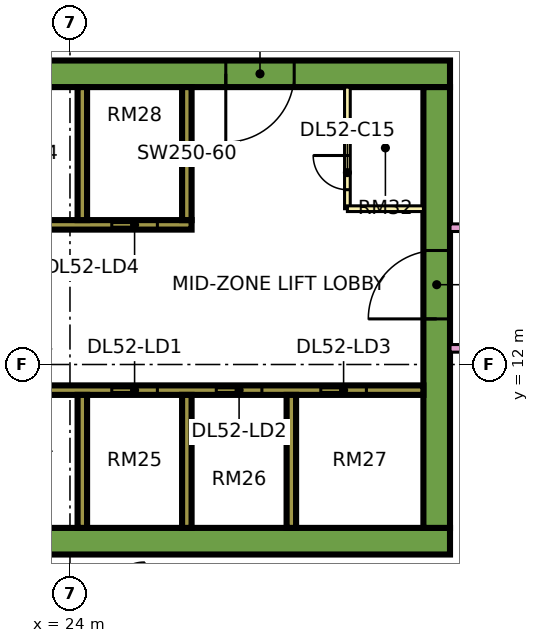
"""IFC4 building model, lengths in metres.
Left out: names, types, materials, properties, quantities, classifications, styles, units other than length and angle.
Written with IfcOpenShell. Run it as: python <this file> out.ifc"""

import sys

from ifc_helpers import new_model, si_unit, direction, frame, frame_2d, origin, place, context, subcontext, project, spatial, rectangle, extrude, element, fill, save


model = new_model("IFC4")
c1 = context("Model", 3, precision=1e-05, world=origin(), true_north=direction((0.0, 1.0)))
c2 = subcontext(c1, "Body", "Model", "MODEL_VIEW")
j1 = project(units=[si_unit("LENGTHUNIT", "METRE"), si_unit("PLANEANGLEUNIT", "RADIAN")], contexts=[c1])
p1 = place(None, origin())
s1 = spatial("IfcSite", under=j1, at=p1, CompositionType="ELEMENT")
p2 = place(p1, origin())
s2 = spatial("IfcBuilding", under=s1, at=p2, CompositionType="ELEMENT")
p3 = place(p2, frame((0.0, 0.0, 222.9)))
s3 = spatial("IfcBuildingStorey", under=s2, at=p3, CompositionType="ELEMENT", Elevation=222.9)
p4 = place(p3, frame((9.0, 7.35, 0.0), z_axis=(0.0, 0.0, 1.0), x_axis=(1.0, 0.0, 0.0)))
e1 = element("IfcWall", 1, at=p4, inside=s3, PredefinedType="SHEAR", context=c2, shape_type="SweptSolid", body=[
    extrude(rectangle(XDim=25.0, YDim=0.7, at=frame_2d((12.5, 0.0))), origin(), (0.0, 0.0, 1.0), 3.75),
])
p5 = place(p3, frame((9.0, 19.65, 0.0), z_axis=(0.0, 0.0, 1.0), x_axis=(1.0, 0.0, 0.0)))
e2 = element("IfcWall", 2, at=p5, inside=s3, PredefinedType="SHEAR", context=c2, shape_type="SweptSolid", body=[
    extrude(rectangle(XDim=25.0, YDim=0.7, at=frame_2d((12.5, 0.0))), origin(), (0.0, 0.0, 1.0), 3.75),
])
p6 = place(p5, frame((19.1, 0.0, 0.0)))
e3 = element("IfcOpeningElement", 3, at=p6, cuts=e2, PredefinedType="OPENING", context=c2, shape_type="SweptSolid", body=[
    extrude(rectangle(XDim=1.8, YDim=2.4, at=frame_2d((0.9, 1.2))), frame((0.0, 0.36, 0.0), z_axis=(0.0, -1.0, 0.0), x_axis=(1.0, 0.0, 0.0)), (0.0, 0.0, 1.0), 0.72),
])
p7 = place(p3, frame((33.65, 7.7, 0.0), z_axis=(0.0, 0.0, 1.0), x_axis=(0.0, 1.0, 0.0)))
e4 = element("IfcWall", 4, at=p7, inside=s3, PredefinedType="SHEAR", context=c2, shape_type="SweptSolid", body=[
    extrude(rectangle(XDim=11.6, YDim=0.7, at=frame_2d((5.8, 0.0))), origin(), (0.0, 0.0, 1.0), 3.75),
])
p8 = place(p7, frame((5.5, 0.0, 0.0)))
e5 = element("IfcOpeningElement", 5, at=p8, cuts=e4, PredefinedType="OPENING", context=c2, shape_type="SweptSolid", body=[
    extrude(rectangle(XDim=1.8, YDim=2.4, at=frame_2d((0.9, 1.2))), frame((0.0, 0.36, 0.0), z_axis=(0.0, -1.0, 0.0), x_axis=(1.0, 0.0, 0.0)), (0.0, 0.0, 1.0), 0.72),
])
p9 = place(p3, frame((13.45, 11.325, 0.0), z_axis=(0.0, 0.0, 1.0), x_axis=(1.0, 0.0, 0.0)))
e6 = element("IfcWall", 6, at=p9, inside=s3, PredefinedType="SHEAR", context=c2, shape_type="SweptSolid", body=[
    extrude(rectangle(XDim=19.85, YDim=0.25, at=frame_2d((9.925, 0.0))), origin(), (0.0, 0.0, 1.0), 3.75),
])
p10 = place(p9, frame((11.65, 0.0, 0.0)))
e7 = element("IfcOpeningElement", 7, at=p10, cuts=e6, PredefinedType="OPENING", context=c2, shape_type="SweptSolid", body=[
    extrude(rectangle(XDim=1.2, YDim=2.2, at=frame_2d((0.6, 1.1))), frame((0.0, 0.135, 0.0), z_axis=(0.0, -1.0, 0.0), x_axis=(1.0, 0.0, 0.0)), (0.0, 0.0, 1.0), 0.27),
])
p11 = place(p9, frame((14.4, 0.0, 0.0)))
e8 = element("IfcOpeningElement", 8, at=p11, cuts=e6, PredefinedType="OPENING", context=c2, shape_type="SweptSolid", body=[
    extrude(rectangle(XDim=1.2, YDim=2.2, at=frame_2d((0.6, 1.1))), frame((0.0, 0.135, 0.0), z_axis=(0.0, -1.0, 0.0), x_axis=(1.0, 0.0, 0.0)), (0.0, 0.0, 1.0), 0.27),
])
p12 = place(p9, frame((17.15, 0.0, 0.0)))
e9 = element("IfcOpeningElement", 9, at=p12, cuts=e6, PredefinedType="OPENING", context=c2, shape_type="SweptSolid", body=[
    extrude(rectangle(XDim=1.2, YDim=2.2, at=frame_2d((0.6, 1.1))), frame((0.0, 0.135, 0.0), z_axis=(0.0, -1.0, 0.0), x_axis=(1.0, 0.0, 0.0)), (0.0, 0.0, 1.0), 0.27),
])
p13 = place(p9, frame((1.55, 0.0, 0.0)))
e10 = element("IfcOpeningElement", 10, at=p13, cuts=e6, PredefinedType="OPENING", context=c2, shape_type="SweptSolid", body=[
    extrude(rectangle(XDim=0.9, YDim=2.1, at=frame_2d((0.45, 1.05))), frame((0.0, 0.135, 0.0), z_axis=(0.0, -1.0, 0.0), x_axis=(1.0, 0.0, 0.0)), (0.0, 0.0, 1.0), 0.27),
])
p14 = place(p9, frame((5.05, 0.0, 0.0)))
e11 = element("IfcOpeningElement", 11, at=p14, cuts=e6, PredefinedType="OPENING", context=c2, shape_type="SweptSolid", body=[
    extrude(rectangle(XDim=0.9, YDim=2.1, at=frame_2d((0.45, 1.05))), frame((0.0, 0.135, 0.0), z_axis=(0.0, -1.0, 0.0), x_axis=(1.0, 0.0, 0.0)), (0.0, 0.0, 1.0), 0.27),
])
p15 = place(p9, frame((8.425, 0.0, 0.0)))
e12 = element("IfcOpeningElement", 12, at=p15, cuts=e6, PredefinedType="OPENING", context=c2, shape_type="SweptSolid", body=[
    extrude(rectangle(XDim=0.9, YDim=2.1, at=frame_2d((0.45, 1.05))), frame((0.0, 0.135, 0.0), z_axis=(0.0, -1.0, 0.0), x_axis=(1.0, 0.0, 0.0)), (0.0, 0.0, 1.0), 0.27),
])
p16 = place(p3, frame((13.45, 15.675, 0.0), z_axis=(0.0, 0.0, 1.0), x_axis=(1.0, 0.0, 0.0)))
e13 = element("IfcWall", 13, at=p16, inside=s3, PredefinedType="SHEAR", context=c2, shape_type="SweptSolid", body=[
    extrude(rectangle(XDim=13.75, YDim=0.25, at=frame_2d((6.875, 0.0))), origin(), (0.0, 0.0, 1.0), 3.75),
])
p17 = place(p16, frame((11.65, 0.0, 0.0)))
e14 = element("IfcOpeningElement", 14, at=p17, cuts=e13, PredefinedType="OPENING", context=c2, shape_type="SweptSolid", body=[
    extrude(rectangle(XDim=1.2, YDim=2.2, at=frame_2d((0.6, 1.1))), frame((0.0, 0.135, 0.0), z_axis=(0.0, -1.0, 0.0), x_axis=(1.0, 0.0, 0.0)), (0.0, 0.0, 1.0), 0.27),
])
for number, where, z_axis, x_axis in (
    (15, (24.325, 7.7, 0.0), (0.0, 0.0, 1.0), (0.0, 1.0, 0.0)),
    (16, (27.075, 7.7, 0.0), (0.0, 0.0, 1.0), (0.0, 1.0, 0.0)),
    (17, (29.825, 7.7, 0.0), (0.0, 0.0, 1.0), (0.0, 1.0, 0.0)),
    (18, (24.325, 15.8, 0.0), (0.0, 0.0, 1.0), (0.0, 1.0, 0.0)),
    (19, (27.075, 15.8, 0.0), (0.0, 0.0, 1.0), (0.0, 1.0, 0.0)),
):
    element("IfcWall", number, at=place(p3, frame(where, z_axis=z_axis, x_axis=x_axis)), inside=s3, PredefinedType="SHEAR", context=c2, shape_type="SweptSolid", body=[
        extrude(rectangle(XDim=3.5, YDim=0.25, at=frame_2d((1.75, 0.0))), origin(), (0.0, 0.0, 1.0), 3.75),
    ])
p18 = place(p3, frame((31.3, 16.1, 0.0), z_axis=(0.0, 0.0, 1.0), x_axis=(0.0, 1.0, 0.0)))
e20 = element("IfcWall", 20, at=p18, inside=s3, PredefinedType="PARTITIONING", context=c2, shape_type="SweptSolid", body=[
    extrude(rectangle(XDim=3.2, YDim=0.15, at=frame_2d((1.6, 0.0))), origin(), (0.0, 0.0, 1.0), 3.35),
])
p19 = place(p18, frame((0.5, 0.0, 0.0)))
e21 = element("IfcOpeningElement", 21, at=p19, cuts=e20, PredefinedType="OPENING", context=c2, shape_type="SweptSolid", body=[
    extrude(rectangle(XDim=0.9, YDim=2.1, at=frame_2d((0.45, 1.05))), frame((0.0, 0.085, 0.0), z_axis=(0.0, -1.0, 0.0), x_axis=(1.0, 0.0, 0.0)), (0.0, 0.0, 1.0), 0.17),
])
p20 = place(p3, frame((31.3, 16.1, 0.0), z_axis=(0.0, 0.0, 1.0), x_axis=(1.0, 0.0, 0.0)))
e22 = element("IfcWall", 22, at=p20, inside=s3, PredefinedType="PARTITIONING", context=c2, shape_type="SweptSolid", body=[
    extrude(rectangle(XDim=2.0, YDim=0.15, at=frame_2d((1.0, 0.0))), origin(), (0.0, 0.0, 1.0), 3.35),
])
p21 = place(p3, frame((34.0, 12.425, 0.0), z_axis=(0.0, 0.0, 1.0), x_axis=(1.0, 0.0, 0.0)))
e23 = element("IfcWall", 23, at=p21, inside=s3, PredefinedType="PARTITIONING", context=c2, shape_type="SweptSolid", body=[
    extrude(rectangle(XDim=2.426, YDim=0.2, at=frame_2d((1.213, 0.0))), origin(), (0.0, 0.0, 1.0), 3.35),
])
p22 = place(p3, frame((34.0, 15.6, 0.0), z_axis=(0.0, 0.0, 1.0), x_axis=(1.0, 0.0, 0.0)))
e24 = element("IfcWall", 24, at=p22, inside=s3, PredefinedType="PARTITIONING", context=c2, shape_type="SweptSolid", body=[
    extrude(rectangle(XDim=10.35, YDim=0.2, at=frame_2d((5.175, 0.0))), origin(), (0.0, 0.0, 1.0), 3.35),
])
p23 = place(p22, frame((5.6, 0.0, 0.0)))
e25 = element("IfcOpeningElement", 25, at=p23, cuts=e24, PredefinedType="OPENING", context=c2, shape_type="SweptSolid", body=[
    extrude(rectangle(XDim=1.0, YDim=2.1, at=frame_2d((0.5, 1.05))), frame((0.0, 0.11, 0.0), z_axis=(0.0, -1.0, 0.0), x_axis=(1.0, 0.0, 0.0)), (0.0, 0.0, 1.0), 0.22),
])
p24 = place(p22, frame((0.45, 0.0, 0.0)))
e26 = element("IfcOpeningElement", 26, at=p24, cuts=e24, PredefinedType="OPENING", context=c2, shape_type="SweptSolid", body=[
    extrude(rectangle(XDim=1.2, YDim=2.1, at=frame_2d((0.6, 1.05))), frame((0.0, 0.11, 0.0), z_axis=(0.0, -1.0, 0.0), x_axis=(1.0, 0.0, 0.0)), (0.0, 0.0, 1.0), 0.22),
])
p25 = place(p10, origin())
e27 = element("IfcDoor", 27, at=p25, inside=s3, OperationType="DOUBLE_DOOR_SLIDING", PredefinedType="DOOR", context=c2, shape_type="SweptSolid", body=[
    extrude(rectangle(XDim=1.2, YDim=2.2, at=frame_2d((0.6, 1.1))), frame((0.0, 0.025, 0.0), z_axis=(0.0, -1.0, 0.0), x_axis=(1.0, 0.0, 0.0)), (0.0, 0.0, 1.0), 0.05),
])
fill(e7, e27)
p26 = place(p11, origin())
e28 = element("IfcDoor", 28, at=p26, inside=s3, OperationType="DOUBLE_DOOR_SLIDING", PredefinedType="DOOR", context=c2, shape_type="SweptSolid", body=[
    extrude(rectangle(XDim=1.2, YDim=2.2, at=frame_2d((0.6, 1.1))), frame((0.0, 0.025, 0.0), z_axis=(0.0, -1.0, 0.0), x_axis=(1.0, 0.0, 0.0)), (0.0, 0.0, 1.0), 0.05),
])
fill(e8, e28)
p27 = place(p12, origin())
e29 = element("IfcDoor", 29, at=p27, inside=s3, OperationType="DOUBLE_DOOR_SLIDING", PredefinedType="DOOR", context=c2, shape_type="SweptSolid", body=[
    extrude(rectangle(XDim=1.2, YDim=2.2, at=frame_2d((0.6, 1.1))), frame((0.0, 0.025, 0.0), z_axis=(0.0, -1.0, 0.0), x_axis=(1.0, 0.0, 0.0)), (0.0, 0.0, 1.0), 0.05),
])
fill(e9, e29)
p28 = place(p17, origin())
e30 = element("IfcDoor", 30, at=p28, inside=s3, OperationType="DOUBLE_DOOR_SLIDING", PredefinedType="DOOR", context=c2, shape_type="SweptSolid", body=[
    extrude(rectangle(XDim=1.2, YDim=2.2, at=frame_2d((0.6, 1.1))), frame((0.0, 0.025, 0.0), z_axis=(0.0, -1.0, 0.0), x_axis=(1.0, 0.0, 0.0)), (0.0, 0.0, 1.0), 0.05),
])
fill(e14, e30)
p29 = place(p8, origin())
e31 = element("IfcDoor", 31, at=p29, inside=s3, OperationType="DOUBLE_DOOR_SINGLE_SWING", PredefinedType="DOOR", context=c2, shape_type="SweptSolid", body=[
    extrude(rectangle(XDim=1.8, YDim=2.4, at=frame_2d((0.9, 1.2))), frame((0.0, 0.025, 0.0), z_axis=(0.0, -1.0, 0.0), x_axis=(1.0, 0.0, 0.0)), (0.0, 0.0, 1.0), 0.05),
])
fill(e5, e31)
p30 = place(p6, frame((1.8, 0.0, 0.0), z_axis=(0.0, 0.0, 1.0), x_axis=(-1.0, 0.0, 0.0)))
e32 = element("IfcDoor", 32, at=p30, inside=s3, OperationType="DOUBLE_DOOR_SINGLE_SWING", PredefinedType="DOOR", context=c2, shape_type="SweptSolid", body=[
    extrude(rectangle(XDim=1.8, YDim=2.4, at=frame_2d((0.9, 1.2))), frame((0.0, 0.025, 0.0), z_axis=(0.0, -1.0, 0.0), x_axis=(1.0, 0.0, 0.0)), (0.0, 0.0, 1.0), 0.05),
])
fill(e3, e32)
p31 = place(p19, frame((0.9, 0.0, 0.0), z_axis=(0.0, 0.0, 1.0), x_axis=(-1.0, 0.0, 0.0)))
e33 = element("IfcDoor", 33, at=p31, inside=s3, OperationType="SINGLE_SWING_RIGHT", PredefinedType="DOOR", context=c2, shape_type="SweptSolid", body=[
    extrude(rectangle(XDim=0.9, YDim=2.1, at=frame_2d((0.45, 1.05))), frame((0.0, 0.025, 0.0), z_axis=(0.0, -1.0, 0.0), x_axis=(1.0, 0.0, 0.0)), (0.0, 0.0, 1.0), 0.05),
])
fill(e21, e33)
save(model, sys.argv[1])
